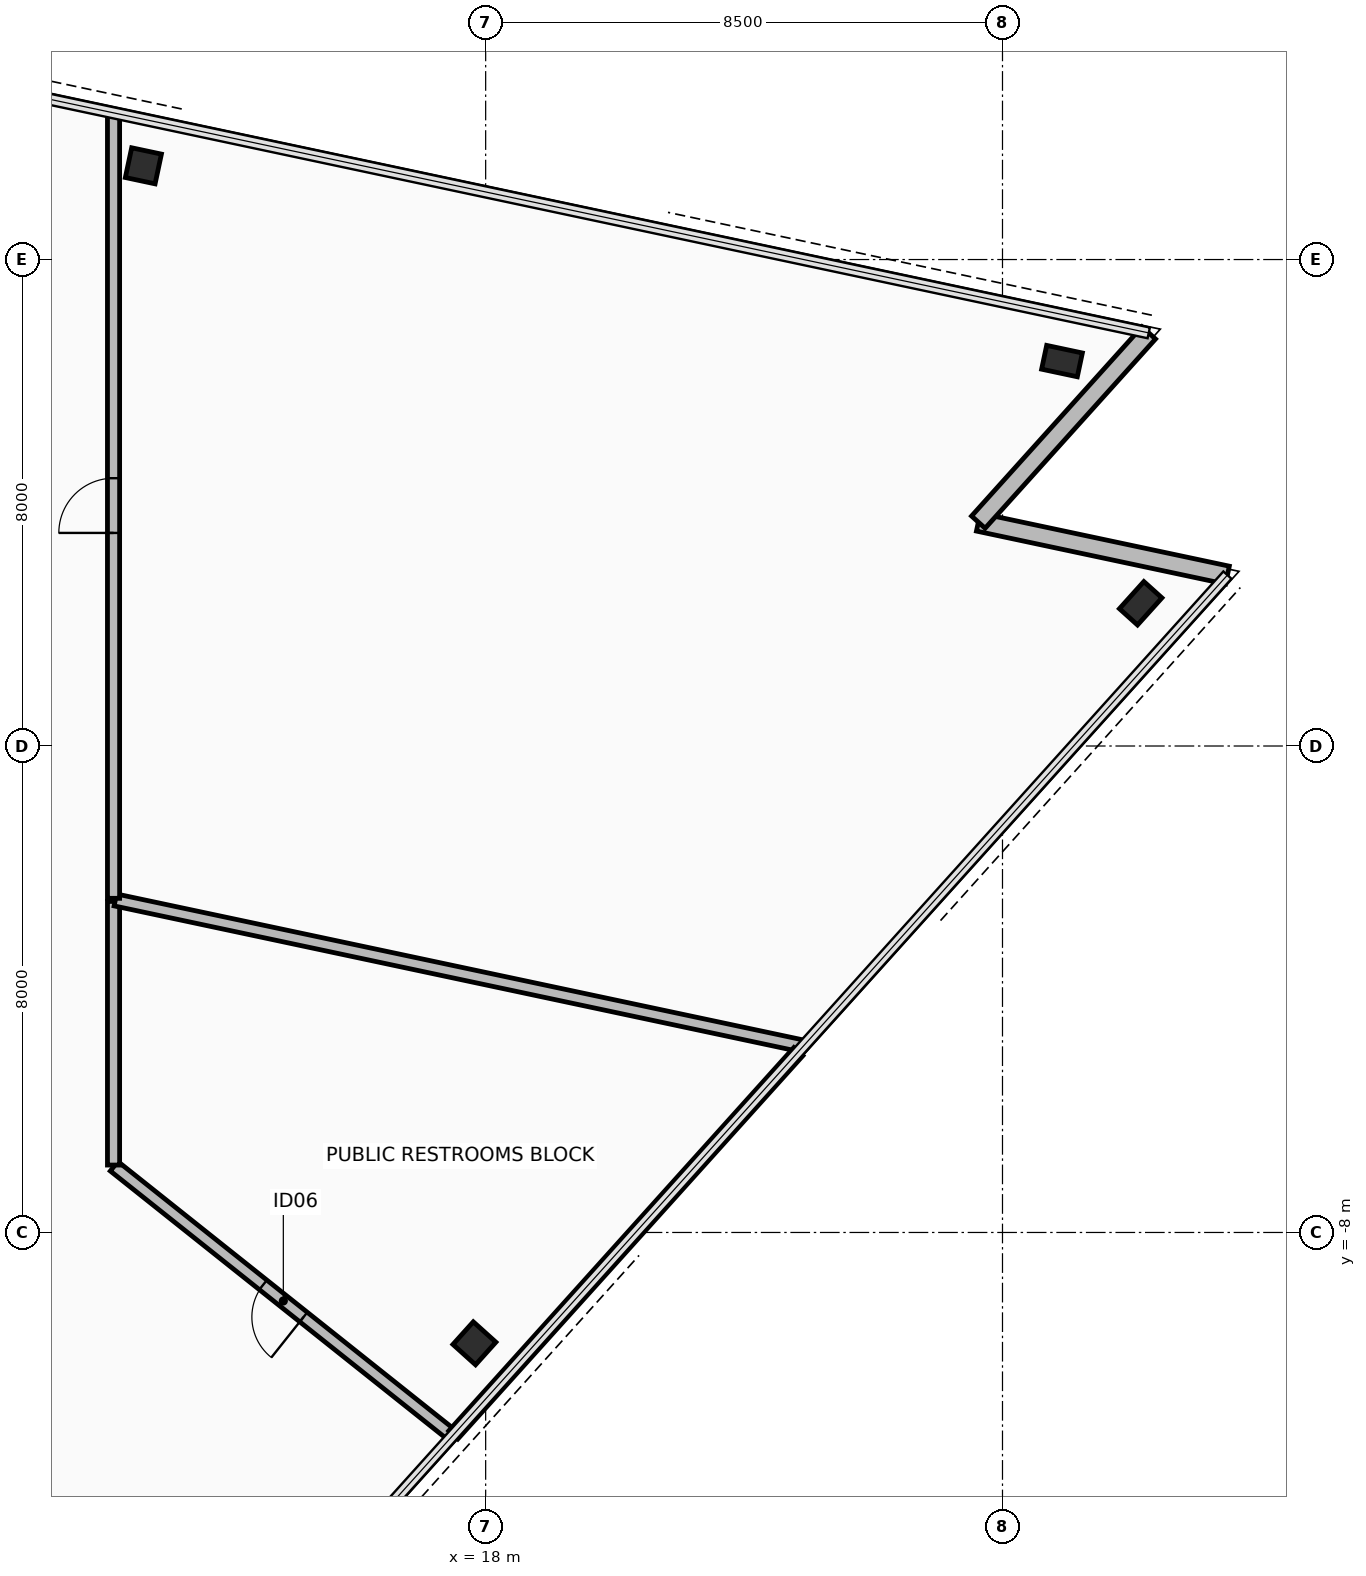
"""IFC4 building model, lengths in metres.
Left out: names, types, materials, properties, quantities, classifications, styles, units other than length and angle.
Written with IfcOpenShell. Run it as: python <this file> out.ifc"""

import sys

from ifc_helpers import new_model, si_unit, direction, frame, frame_2d, origin, origin_2d, place, context, subcontext, project, spatial, rectangle, hollow_rectangle, extrude, element, fill, save


model = new_model("IFC4")
c1 = context("Model", 3, precision=1e-05, world=origin(), true_north=direction((0.0, 1.0)))
c2 = subcontext(c1, "Body", "Model", "MODEL_VIEW")
j1 = project(units=[si_unit("LENGTHUNIT", "METRE"), si_unit("PLANEANGLEUNIT", "RADIAN")], contexts=[c1])
p1 = place(None, origin())
s1 = spatial("IfcSite", under=j1, at=p1, CompositionType="ELEMENT")
p2 = place(p1, origin())
s2 = spatial("IfcBuilding", under=s1, at=p2, CompositionType="ELEMENT")
p3 = place(p2, frame((0.0, 0.0, 207.65)))
s3 = spatial("IfcBuildingStorey", under=s2, at=p3, CompositionType="ELEMENT", Elevation=207.65)
p4 = place(p3, frame((17.815, -9.823, 0.0), z_axis=(0.0, 0.0, 1.0), x_axis=(0.669130606359, 0.743144825477, 0.0)))
e1 = element("IfcColumn", 1, at=p4, inside=s3, PredefinedType="COLUMN", context=c2, shape_type="SweptSolid", body=[
    extrude(hollow_rectangle(XDim=0.5, YDim=0.5, WallThickness=0.032, at=origin_2d()), origin(), (0.0, 0.0, 1.0), 3.6),
])
for number, where, z_axis, x_axis in (
    (2, (28.773, 2.347, 0.0), (0.0, 0.0, 1.0), (0.669, 0.743, 0.0)),
    (3, (27.479, 6.33, 0.0), (0.0, 0.0, 1.0), (-0.978, 0.208, 0.0)),
):
    element("IfcColumn", number, at=place(p3, frame(where, z_axis=z_axis, x_axis=x_axis)), inside=s3, PredefinedType="COLUMN", context=c2, shape_type="SweptSolid", body=[
        extrude(hollow_rectangle(XDim=0.4, YDim=0.6, WallThickness=0.03, at=origin_2d()), origin(), (0.0, 0.0, 1.0), 3.6),
    ])
p5 = place(p3, frame((12.371, 9.542, 0.0), z_axis=(0.0, 0.0, 1.0), x_axis=(-0.978147600734, 0.207911690818, 0.0)))
e4 = element("IfcColumn", 4, at=p5, inside=s3, PredefinedType="COLUMN", context=c2, shape_type="SweptSolid", body=[
    extrude(hollow_rectangle(XDim=0.5, YDim=0.5, WallThickness=0.032, at=origin_2d()), origin(), (0.0, 0.0, 1.0), 3.6),
])
for number, where, z_axis, x_axis in (
    (5, (30.199, 2.811, 0.0), (0.0, 0.0, 1.0), (-0.978, 0.208, 0.0)),
    (6, (26.103, 3.681, 0.0), (0.0, 0.0, 1.0), (0.669, 0.743, 0.0)),
):
    element("IfcWall", number, at=place(p3, frame(where, z_axis=z_axis, x_axis=x_axis)), inside=s3, PredefinedType="STANDARD", context=c2, shape_type="SweptSolid", body=[
        extrude(rectangle(XDim=4.188, YDim=0.3, at=frame_2d((2.094, 0.0))), origin(), (0.0, 0.0, 1.0), 2.715),
    ])
p6 = place(p3, frame((17.456, -11.342, 0.0), z_axis=(0.0, 0.0, 1.0), x_axis=(-0.782369623791, 0.622814395923, 0.0)))
e7 = element("IfcWall", 7, at=p6, inside=s3, PredefinedType="PARTITIONING", context=c2, shape_type="SweptSolid", body=[
    extrude(rectangle(XDim=7.115, YDim=0.2, at=frame_2d((3.558, 0.0))), origin(), (0.0, 0.0, 1.0), 2.715),
])
p7 = place(p6, frame((3.133, 0.0, 0.0)))
e8 = element("IfcOpeningElement", 8, at=p7, cuts=e7, PredefinedType="OPENING", context=c2, shape_type="SweptSolid", body=[
    extrude(rectangle(XDim=0.85, YDim=2.1, at=frame_2d((0.425, 1.05))), frame((0.0, 0.11, 0.0), z_axis=(0.0, -1.0, 0.0), x_axis=(1.0, 0.0, 0.0)), (0.0, 0.0, 1.0), 0.22),
])
p8 = place(p3, frame((11.88, -6.891, 0.0), z_axis=(0.0, 0.0, 1.0), x_axis=(0.0, 1.0, 0.0)))
e9 = element("IfcWall", 9, at=p8, inside=s3, PredefinedType="PARTITIONING", context=c2, shape_type="SweptSolid", body=[
    extrude(rectangle(XDim=4.335, YDim=0.2, at=frame_2d((2.168, 0.0))), origin(), (0.0, 0.0, 1.0), 3.42),
])
p9 = place(p3, frame((11.91, -2.531, 0.0), z_axis=(0.0, 0.0, 1.0), x_axis=(0.978148872081, -0.207905709508, 0.0)))
e10 = element("IfcWall", 10, at=p9, inside=s3, PredefinedType="PARTITIONING", context=c2, shape_type="SweptSolid", body=[
    extrude(rectangle(XDim=11.567, YDim=0.2, at=frame_2d((5.783, 0.0))), origin(), (0.0, 0.0, 1.0), 2.715),
])
p10 = place(p3, frame((23.143, -5.027, 0.0), z_axis=(0.0, 0.0, 1.0), x_axis=(-0.669131712816, -0.743143829218, 0.0)))
e11 = element("IfcWall", 11, at=p10, inside=s3, PredefinedType="PARTITIONING", context=c2, shape_type="SweptSolid", body=[
    extrude(rectangle(XDim=8.481, YDim=0.2, at=frame_2d((4.24, 0.0))), origin(), (0.0, 0.0, 1.0), 3.42),
])
p11 = place(p3, frame((11.88, -2.505, 0.0), z_axis=(0.0, 0.0, 1.0), x_axis=(0.0, 1.0, 0.0)))
e12 = element("IfcWall", 12, at=p11, inside=s3, PredefinedType="PARTITIONING", context=c2, shape_type="SweptSolid", body=[
    extrude(rectangle(XDim=12.917, YDim=0.2, at=frame_2d((6.458, 0.0))), origin(), (0.0, 0.0, 1.0), 2.715),
])
p12 = place(p11, frame((6.009, 0.0, 0.0)))
e13 = element("IfcOpeningElement", 13, at=p12, cuts=e12, PredefinedType="OPENING", context=c2, shape_type="SweptSolid", body=[
    extrude(rectangle(XDim=0.9, YDim=2.1, at=frame_2d((0.45, 1.05))), frame((0.0, 0.11, 0.0), z_axis=(0.0, -1.0, 0.0), x_axis=(1.0, 0.0, 0.0)), (0.0, 0.0, 1.0), 0.22),
])
p13 = place(p7, origin())
e14 = element("IfcDoor", 14, at=p13, inside=s3, OperationType="SINGLE_SWING_RIGHT", PredefinedType="DOOR", context=c2, shape_type="SweptSolid", body=[
    extrude(rectangle(XDim=0.85, YDim=2.1, at=frame_2d((0.425, 1.05))), frame((0.0, 0.025, 0.0), z_axis=(0.0, -1.0, 0.0), x_axis=(1.0, 0.0, 0.0)), (0.0, 0.0, 1.0), 0.05),
])
fill(e8, e14)
p14 = place(p12, origin())
e15 = element("IfcDoor", 15, at=p14, inside=s3, OperationType="SINGLE_SWING_LEFT", PredefinedType="DOOR", context=c2, shape_type="SweptSolid", body=[
    extrude(rectangle(XDim=0.9, YDim=2.1, at=frame_2d((0.45, 1.05))), frame((0.0, 0.025, 0.0), z_axis=(0.0, -1.0, 0.0), x_axis=(1.0, 0.0, 0.0)), (0.0, 0.0, 1.0), 0.05),
])
fill(e13, e15)
save(model, sys.argv[1])
